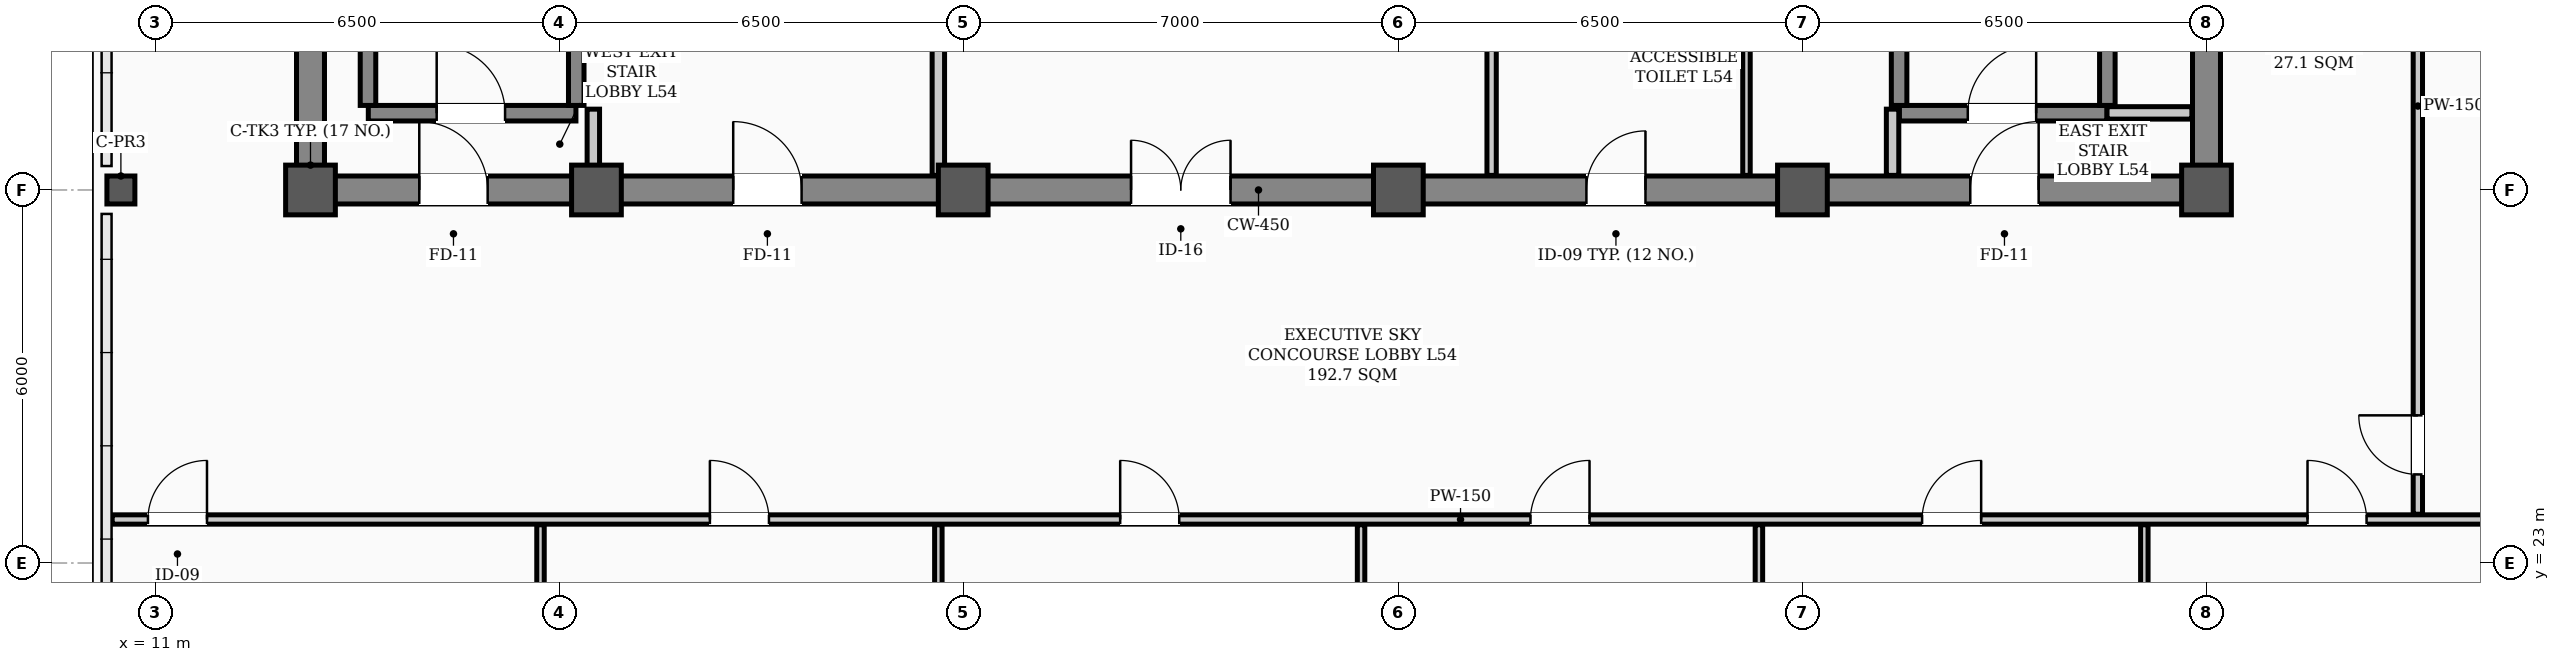
"""IFC4 building model, lengths in metres.
Left out: names, types, materials, properties, quantities, classifications, styles, units other than length and angle.
Written with IfcOpenShell. Run it as: python <this file> out.ifc"""

import sys

from ifc_helpers import new_model, si_unit, direction, frame, frame_2d, origin, origin_2d, place, context, subcontext, project, spatial, rectangle, hollow_rectangle, extrude, element, fill, save


model = new_model("IFC4")
c1 = context("Model", 3, precision=1e-05, world=origin(), true_north=direction((0.0, 1.0)))
c2 = subcontext(c1, "Body", "Model", "MODEL_VIEW")
j1 = project(units=[si_unit("LENGTHUNIT", "METRE"), si_unit("PLANEANGLEUNIT", "RADIAN")], contexts=[c1])
p1 = place(None, origin())
s1 = spatial("IfcSite", under=j1, at=p1, CompositionType="ELEMENT")
p2 = place(p1, origin())
s2 = spatial("IfcBuilding", under=s1, at=p2, CompositionType="ELEMENT")
p3 = place(p2, frame((0.0, 0.0, 218.9)))
s3 = spatial("IfcBuildingStorey", under=s2, at=p3, CompositionType="ELEMENT", Elevation=218.9)
for number, where, z_axis, x_axis in (
    (1, (13.5, 29.0, 0.0), (0.0, 0.0, 1.0), (1.0, 0.0, 0.0)),
    (2, (18.1, 29.0, 0.0), (0.0, 0.0, 1.0), (1.0, 0.0, 0.0)),
    (3, (24.0, 29.0, 0.0), (0.0, 0.0, 1.0), (1.0, 0.0, 0.0)),
    (4, (31.0, 29.0, 0.0), (0.0, 0.0, 1.0), (1.0, 0.0, 0.0)),
    (5, (37.5, 29.0, 0.0), (0.0, 0.0, 1.0), (1.0, 0.0, 0.0)),
    (6, (44.0, 29.0, 0.0), (0.0, 0.0, 1.0), (1.0, 0.0, 0.0)),
):
    element("IfcColumn", number, at=place(p3, frame(where, z_axis=z_axis, x_axis=x_axis)), inside=s3, PredefinedType="COLUMN", context=c2, shape_type="SweptSolid", body=[
        extrude(hollow_rectangle(XDim=0.8, YDim=0.8, WallThickness=0.032, InnerFilletRadius=0.016, OuterFilletRadius=0.048, at=origin_2d()), origin(), (0.0, 0.0, 1.0), 3.9),
    ])
p4 = place(p3, frame((10.45, 29.0, 0.0), z_axis=(0.0, 0.0, 1.0), x_axis=(1.0, 0.0, 0.0)))
e7 = element("IfcColumn", 7, at=p4, inside=s3, PredefinedType="COLUMN", context=c2, shape_type="SweptSolid", body=[
    extrude(hollow_rectangle(XDim=0.45, YDim=0.45, WallThickness=0.022, InnerFilletRadius=0.022, OuterFilletRadius=0.044, at=origin_2d()), origin(), (0.0, 0.0, 1.0), 3.9),
])
p5 = place(p3, frame((13.5, 29.0, 0.0), z_axis=(0.0, 0.0, 1.0), x_axis=(1.0, 0.0, 0.0)))
e8 = element("IfcWall", 8, at=p5, inside=s3, PredefinedType="SHEAR", context=c2, shape_type="SweptSolid", body=[
    extrude(rectangle(XDim=30.5, YDim=0.45, at=frame_2d((15.25, 0.0))), origin(), (0.0, 0.0, 1.0), 3.72),
])
p6 = place(p5, frame((1.75, 0.0, 0.0)))
e9 = element("IfcOpeningElement", 9, at=p6, cuts=e8, PredefinedType="OPENING", context=c2, shape_type="SweptSolid", body=[
    extrude(rectangle(XDim=1.1, YDim=2.08, at=frame_2d((0.55, 1.04))), frame((0.0, 0.235, 0.0), z_axis=(0.0, -1.0, 0.0), x_axis=(1.0, 0.0, 0.0)), (0.0, 0.0, 1.0), 0.47),
])
p7 = place(p5, frame((26.7, 0.0, 0.0)))
e10 = element("IfcOpeningElement", 10, at=p7, cuts=e8, PredefinedType="OPENING", context=c2, shape_type="SweptSolid", body=[
    extrude(rectangle(XDim=1.1, YDim=2.08, at=frame_2d((0.55, 1.04))), frame((0.0, 0.235, 0.0), z_axis=(0.0, -1.0, 0.0), x_axis=(1.0, 0.0, 0.0)), (0.0, 0.0, 1.0), 0.47),
])
p8 = place(p5, frame((6.8, 0.0, 0.0)))
e11 = element("IfcOpeningElement", 11, at=p8, cuts=e8, PredefinedType="OPENING", context=c2, shape_type="SweptSolid", body=[
    extrude(rectangle(XDim=1.1, YDim=2.08, at=frame_2d((0.55, 1.04))), frame((0.0, 0.235, 0.0), z_axis=(0.0, -1.0, 0.0), x_axis=(1.0, 0.0, 0.0)), (0.0, 0.0, 1.0), 0.47),
])
p9 = place(p5, frame((13.2, 0.0, 0.0)))
e12 = element("IfcOpeningElement", 12, at=p9, cuts=e8, PredefinedType="OPENING", context=c2, shape_type="SweptSolid", body=[
    extrude(rectangle(XDim=1.6, YDim=2.08, at=frame_2d((0.8, 1.04))), frame((0.0, 0.235, 0.0), z_axis=(0.0, -1.0, 0.0), x_axis=(1.0, 0.0, 0.0)), (0.0, 0.0, 1.0), 0.47),
])
p10 = place(p5, frame((20.525, 0.0, 0.0)))
e13 = element("IfcOpeningElement", 13, at=p10, cuts=e8, PredefinedType="OPENING", context=c2, shape_type="SweptSolid", body=[
    extrude(rectangle(XDim=0.95, YDim=2.08, at=frame_2d((0.475, 1.04))), frame((0.0, 0.235, 0.0), z_axis=(0.0, -1.0, 0.0), x_axis=(1.0, 0.0, 0.0)), (0.0, 0.0, 1.0), 0.47),
])
for number, where, z_axis, x_axis in (
    (14, (13.5, 29.35, 0.0), (0.0, 0.0, 1.0), (0.0, 1.0, 0.0)),
    (15, (44.0, 29.35, 0.0), (0.0, 0.0, 1.0), (0.0, 1.0, 0.0)),
):
    element("IfcWall", number, at=place(p3, frame(where, z_axis=z_axis, x_axis=x_axis)), inside=s3, PredefinedType="SHEAR", context=c2, shape_type="SweptSolid", body=[
        extrude(rectangle(XDim=8.6, YDim=0.45, at=frame_2d((4.3, 0.0))), origin(), (0.0, 0.0, 1.0), 3.72),
    ])
p11 = place(p3, frame((14.43, 30.235, 0.0), z_axis=(0.0, 0.0, 1.0), x_axis=(1.0, 0.0, 0.0)))
e16 = element("IfcWall", 16, at=p11, inside=s3, PredefinedType="STANDARD", context=c2, shape_type="SweptSolid", body=[
    extrude(rectangle(XDim=3.34, YDim=0.25, at=frame_2d((1.67, 0.0))), origin(), (0.0, 0.0, 1.0), 3.72),
])
p12 = place(p11, frame((1.1, 0.0, 0.0)))
e17 = element("IfcOpeningElement", 17, at=p12, cuts=e16, PredefinedType="OPENING", context=c2, shape_type="SweptSolid", body=[
    extrude(rectangle(XDim=1.1, YDim=2.08, at=frame_2d((0.55, 1.04))), frame((0.0, 0.135, 0.0), z_axis=(0.0, -1.0, 0.0), x_axis=(1.0, 0.0, 0.0)), (0.0, 0.0, 1.0), 0.27),
])
for number, where, z_axis, x_axis in (
    (18, (14.425, 30.36, 0.0), (0.0, 0.0, 1.0), (0.0, 1.0, 0.0)),
    (19, (17.775, 30.36, 0.0), (0.0, 0.0, 1.0), (0.0, 1.0, 0.0)),
):
    element("IfcWall", number, at=place(p3, frame(where, z_axis=z_axis, x_axis=x_axis)), inside=s3, PredefinedType="STANDARD", context=c2, shape_type="SweptSolid", body=[
        extrude(rectangle(XDim=7.184, YDim=0.25, at=frame_2d((3.592, 0.0))), origin(), (0.0, 0.0, 1.0), 3.72),
    ])
p13 = place(p3, frame((39.06, 30.235, 0.0), z_axis=(0.0, 0.0, 1.0), x_axis=(1.0, 0.0, 0.0)))
e20 = element("IfcWall", 20, at=p13, inside=s3, PredefinedType="STANDARD", context=c2, shape_type="SweptSolid", body=[
    extrude(rectangle(XDim=3.34, YDim=0.25, at=frame_2d((1.67, 0.0))), origin(), (0.0, 0.0, 1.0), 3.72),
])
p14 = place(p13, frame((1.1, 0.0, 0.0)))
e21 = element("IfcOpeningElement", 21, at=p14, cuts=e20, PredefinedType="OPENING", context=c2, shape_type="SweptSolid", body=[
    extrude(rectangle(XDim=1.1, YDim=2.08, at=frame_2d((0.55, 1.04))), frame((0.0, 0.135, 0.0), z_axis=(0.0, -1.0, 0.0), x_axis=(1.0, 0.0, 0.0)), (0.0, 0.0, 1.0), 0.27),
])
for number, where, z_axis, x_axis in (
    (22, (39.055, 30.36, 0.0), (0.0, 0.0, 1.0), (0.0, 1.0, 0.0)),
    (23, (42.405, 30.36, 0.0), (0.0, 0.0, 1.0), (0.0, 1.0, 0.0)),
):
    element("IfcWall", number, at=place(p3, frame(where, z_axis=z_axis, x_axis=x_axis)), inside=s3, PredefinedType="STANDARD", context=c2, shape_type="SweptSolid", body=[
        extrude(rectangle(XDim=7.184, YDim=0.25, at=frame_2d((3.592, 0.0))), origin(), (0.0, 0.0, 1.0), 3.72),
    ])
p15 = place(p3, frame((42.4, 30.24, 0.0), z_axis=(0.0, 0.0, 1.0), x_axis=(1.0, 0.0, 0.0)))
e24 = element("IfcWall", 24, at=p15, inside=s3, PredefinedType="STANDARD", context=c2, shape_type="SweptSolid", body=[
    extrude(rectangle(XDim=1.365, YDim=0.2, at=frame_2d((0.683, 0.0))), origin(), (0.0, 0.0, 1.0), 3.2),
])
p16 = place(p3, frame((10.31, 23.7, 0.0), z_axis=(0.0, 0.0, 1.0), x_axis=(1.0, 0.0, 0.0)))
e25 = element("IfcWall", 25, at=p16, inside=s3, PredefinedType="PARTITIONING", context=c2, shape_type="SweptSolid", body=[
    extrude(rectangle(XDim=43.38, YDim=0.15, at=frame_2d((21.69, 0.0))), origin(), (0.0, 0.0, 1.0), 3.2),
])
p17 = place(p16, frame((0.575, 0.0, 0.0)))
e26 = element("IfcOpeningElement", 26, at=p17, cuts=e25, PredefinedType="OPENING", context=c2, shape_type="SweptSolid", body=[
    extrude(rectangle(XDim=0.95, YDim=2.08, at=frame_2d((0.475, 1.04))), frame((0.0, 0.085, 0.0), z_axis=(0.0, -1.0, 0.0), x_axis=(1.0, 0.0, 0.0)), (0.0, 0.0, 1.0), 0.17),
])
p18 = place(p16, frame((9.615, 0.0, 0.0)))
e27 = element("IfcOpeningElement", 27, at=p18, cuts=e25, PredefinedType="OPENING", context=c2, shape_type="SweptSolid", body=[
    extrude(rectangle(XDim=0.95, YDim=2.08, at=frame_2d((0.475, 1.04))), frame((0.0, 0.085, 0.0), z_axis=(0.0, -1.0, 0.0), x_axis=(1.0, 0.0, 0.0)), (0.0, 0.0, 1.0), 0.17),
])
p19 = place(p16, frame((16.215, 0.0, 0.0)))
e28 = element("IfcOpeningElement", 28, at=p19, cuts=e25, PredefinedType="OPENING", context=c2, shape_type="SweptSolid", body=[
    extrude(rectangle(XDim=0.95, YDim=2.08, at=frame_2d((0.475, 1.04))), frame((0.0, 0.085, 0.0), z_axis=(0.0, -1.0, 0.0), x_axis=(1.0, 0.0, 0.0)), (0.0, 0.0, 1.0), 0.17),
])
p20 = place(p16, frame((22.815, 0.0, 0.0)))
e29 = element("IfcOpeningElement", 29, at=p20, cuts=e25, PredefinedType="OPENING", context=c2, shape_type="SweptSolid", body=[
    extrude(rectangle(XDim=0.95, YDim=2.08, at=frame_2d((0.475, 1.04))), frame((0.0, 0.085, 0.0), z_axis=(0.0, -1.0, 0.0), x_axis=(1.0, 0.0, 0.0)), (0.0, 0.0, 1.0), 0.17),
])
p21 = place(p16, frame((29.115, 0.0, 0.0)))
e30 = element("IfcOpeningElement", 30, at=p21, cuts=e25, PredefinedType="OPENING", context=c2, shape_type="SweptSolid", body=[
    extrude(rectangle(XDim=0.95, YDim=2.08, at=frame_2d((0.475, 1.04))), frame((0.0, 0.085, 0.0), z_axis=(0.0, -1.0, 0.0), x_axis=(1.0, 0.0, 0.0)), (0.0, 0.0, 1.0), 0.17),
])
p22 = place(p16, frame((35.315, 0.0, 0.0)))
e31 = element("IfcOpeningElement", 31, at=p22, cuts=e25, PredefinedType="OPENING", context=c2, shape_type="SweptSolid", body=[
    extrude(rectangle(XDim=0.95, YDim=2.08, at=frame_2d((0.475, 1.04))), frame((0.0, 0.085, 0.0), z_axis=(0.0, -1.0, 0.0), x_axis=(1.0, 0.0, 0.0)), (0.0, 0.0, 1.0), 0.17),
])
for number, where, z_axis, x_axis in (
    (32, (18.05, 29.235, 0.0), (0.0, 0.0, 1.0), (0.0, 1.0, 0.0)),
    (33, (38.95, 29.235, 0.0), (0.0, 0.0, 1.0), (0.0, 1.0, 0.0)),
):
    element("IfcWall", number, at=place(p3, frame(where, z_axis=z_axis, x_axis=x_axis)), inside=s3, PredefinedType="STANDARD", context=c2, shape_type="SweptSolid", body=[
        extrude(rectangle(XDim=1.065, YDim=0.2, at=frame_2d((0.532, 0.0))), origin(), (0.0, 0.0, 1.0), 3.35),
    ])
p23 = place(p3, frame((23.6, 29.235, 0.0), z_axis=(0.0, 0.0, 1.0), x_axis=(0.0, 1.0, 0.0)))
e34 = element("IfcWall", 34, at=p23, inside=s3, PredefinedType="STANDARD", context=c2, shape_type="SweptSolid", body=[
    extrude(rectangle(XDim=5.465, YDim=0.2, at=frame_2d((2.732, 0.0))), origin(), (0.0, 0.0, 1.0), 3.2),
])
p24 = place(p3, frame((32.5, 29.235, 0.0), z_axis=(0.0, 0.0, 1.0), x_axis=(0.0, 1.0, 0.0)))
e35 = element("IfcWall", 35, at=p24, inside=s3, PredefinedType="PARTITIONING", context=c2, shape_type="SweptSolid", body=[
    extrude(rectangle(XDim=2.53, YDim=0.15, at=frame_2d((1.265, 0.0))), origin(), (0.0, 0.0, 1.0), 3.35),
])
p25 = place(p3, frame((36.6, 29.235, 0.0), z_axis=(0.0, 0.0, 1.0), x_axis=(0.0, 1.0, 0.0)))
e36 = element("IfcWall", 36, at=p25, inside=s3, PredefinedType="PARTITIONING", context=c2, shape_type="SweptSolid", body=[
    extrude(rectangle(XDim=2.53, YDim=0.12, at=frame_2d((1.265, 0.0))), origin(), (0.0, 0.0, 1.0), 3.35),
])
p26 = place(p3, frame((47.4, 23.785, 0.0), z_axis=(0.0, 0.0, 1.0), x_axis=(0.0, 1.0, 0.0)))
e37 = element("IfcWall", 37, at=p26, inside=s3, PredefinedType="PARTITIONING", context=c2, shape_type="SweptSolid", body=[
    extrude(rectangle(XDim=13.13, YDim=0.15, at=frame_2d((6.565, 0.0))), origin(), (0.0, 0.0, 1.0), 3.1),
])
p27 = place(p26, frame((0.64, 0.0, 0.0)))
e38 = element("IfcOpeningElement", 38, at=p27, cuts=e37, PredefinedType="OPENING", context=c2, shape_type="SweptSolid", body=[
    extrude(rectangle(XDim=0.95, YDim=2.08, at=frame_2d((0.475, 1.04))), frame((0.0, 0.085, 0.0), z_axis=(0.0, -1.0, 0.0), x_axis=(1.0, 0.0, 0.0)), (0.0, 0.0, 1.0), 0.17),
])
p28 = place(p26, frame((10.44, 0.0, 0.0)))
e39 = element("IfcOpeningElement", 39, at=p28, cuts=e37, PredefinedType="OPENING", context=c2, shape_type="SweptSolid", body=[
    extrude(rectangle(XDim=0.95, YDim=2.08, at=frame_2d((0.475, 1.04))), frame((0.0, 0.085, 0.0), z_axis=(0.0, -1.0, 0.0), x_axis=(1.0, 0.0, 0.0)), (0.0, 0.0, 1.0), 0.17),
])
p29 = place(p3, frame((17.2, 11.56, 0.0), z_axis=(0.0, 0.0, 1.0), x_axis=(0.0, 1.0, 0.0)))
e40 = element("IfcWall", 40, at=p29, inside=s3, PredefinedType="PARTITIONING", context=c2, shape_type="SweptSolid", body=[
    extrude(rectangle(XDim=12.055, YDim=0.12, at=frame_2d((6.027, 0.0))), origin(), (0.0, 0.0, 1.0), 3.1),
])
p30 = place(p3, frame((23.6, 13.32, 0.0), z_axis=(0.0, 0.0, 1.0), x_axis=(0.0, 1.0, 0.0)))
e41 = element("IfcWall", 41, at=p30, inside=s3, PredefinedType="PARTITIONING", context=c2, shape_type="SweptSolid", body=[
    extrude(rectangle(XDim=10.295, YDim=0.12, at=frame_2d((5.147, 0.0))), origin(), (0.0, 0.0, 1.0), 3.1),
])
for number, where, z_axis, x_axis in (
    (42, (30.4, 11.56, 0.0), (0.0, 0.0, 1.0), (0.0, 1.0, 0.0)),
    (43, (36.8, 11.56, 0.0), (0.0, 0.0, 1.0), (0.0, 1.0, 0.0)),
    (44, (43.0, 11.56, 0.0), (0.0, 0.0, 1.0), (0.0, 1.0, 0.0)),
):
    element("IfcWall", number, at=place(p3, frame(where, z_axis=z_axis, x_axis=x_axis)), inside=s3, PredefinedType="PARTITIONING", context=c2, shape_type="SweptSolid", body=[
        extrude(rectangle(XDim=12.055, YDim=0.12, at=frame_2d((6.027, 0.0))), origin(), (0.0, 0.0, 1.0), 3.1),
    ])
p31 = place(p12, origin())
e45 = element("IfcDoor", 45, at=p31, inside=s3, OperationType="SINGLE_SWING_LEFT", PredefinedType="DOOR", context=c2, shape_type="SweptSolid", body=[
    extrude(rectangle(XDim=1.1, YDim=2.08, at=frame_2d((0.55, 1.04))), frame((0.0, 0.025, 0.0), z_axis=(0.0, -1.0, 0.0), x_axis=(1.0, 0.0, 0.0)), (0.0, 0.0, 1.0), 0.05),
])
fill(e17, e45)
p32 = place(p14, origin())
e46 = element("IfcDoor", 46, at=p32, inside=s3, OperationType="SINGLE_SWING_RIGHT", PredefinedType="DOOR", context=c2, shape_type="SweptSolid", body=[
    extrude(rectangle(XDim=1.1, YDim=2.08, at=frame_2d((0.55, 1.04))), frame((0.0, 0.025, 0.0), z_axis=(0.0, -1.0, 0.0), x_axis=(1.0, 0.0, 0.0)), (0.0, 0.0, 1.0), 0.05),
])
fill(e21, e46)
p33 = place(p6, origin())
e47 = element("IfcDoor", 47, at=p33, inside=s3, OperationType="SINGLE_SWING_LEFT", PredefinedType="DOOR", context=c2, shape_type="SweptSolid", body=[
    extrude(rectangle(XDim=1.1, YDim=2.08, at=frame_2d((0.55, 1.04))), frame((0.0, 0.025, 0.0), z_axis=(0.0, -1.0, 0.0), x_axis=(1.0, 0.0, 0.0)), (0.0, 0.0, 1.0), 0.05),
])
fill(e9, e47)
p34 = place(p7, origin())
e48 = element("IfcDoor", 48, at=p34, inside=s3, OperationType="SINGLE_SWING_RIGHT", PredefinedType="DOOR", context=c2, shape_type="SweptSolid", body=[
    extrude(rectangle(XDim=1.1, YDim=2.08, at=frame_2d((0.55, 1.04))), frame((0.0, 0.025, 0.0), z_axis=(0.0, -1.0, 0.0), x_axis=(1.0, 0.0, 0.0)), (0.0, 0.0, 1.0), 0.05),
])
fill(e10, e48)
p35 = place(p8, origin())
e49 = element("IfcDoor", 49, at=p35, inside=s3, OperationType="SINGLE_SWING_LEFT", PredefinedType="DOOR", context=c2, shape_type="SweptSolid", body=[
    extrude(rectangle(XDim=1.1, YDim=2.08, at=frame_2d((0.55, 1.04))), frame((0.0, 0.025, 0.0), z_axis=(0.0, -1.0, 0.0), x_axis=(1.0, 0.0, 0.0)), (0.0, 0.0, 1.0), 0.05),
])
fill(e11, e49)
p36 = place(p9, origin())
e50 = element("IfcDoor", 50, at=p36, inside=s3, OperationType="DOUBLE_DOOR_SINGLE_SWING", PredefinedType="DOOR", context=c2, shape_type="SweptSolid", body=[
    extrude(rectangle(XDim=1.6, YDim=2.08, at=frame_2d((0.8, 1.04))), frame((0.0, 0.025, 0.0), z_axis=(0.0, -1.0, 0.0), x_axis=(1.0, 0.0, 0.0)), (0.0, 0.0, 1.0), 0.05),
])
fill(e12, e50)
p37 = place(p10, origin())
e51 = element("IfcDoor", 51, at=p37, inside=s3, OperationType="SINGLE_SWING_RIGHT", PredefinedType="DOOR", context=c2, shape_type="SweptSolid", body=[
    extrude(rectangle(XDim=0.95, YDim=2.08, at=frame_2d((0.475, 1.04))), frame((0.0, 0.025, 0.0), z_axis=(0.0, -1.0, 0.0), x_axis=(1.0, 0.0, 0.0)), (0.0, 0.0, 1.0), 0.05),
])
fill(e13, e51)
p38 = place(p17, origin())
e52 = element("IfcDoor", 52, at=p38, inside=s3, OperationType="SINGLE_SWING_RIGHT", PredefinedType="DOOR", context=c2, shape_type="SweptSolid", body=[
    extrude(rectangle(XDim=0.95, YDim=2.08, at=frame_2d((0.475, 1.04))), frame((0.0, 0.025, 0.0), z_axis=(0.0, -1.0, 0.0), x_axis=(1.0, 0.0, 0.0)), (0.0, 0.0, 1.0), 0.05),
])
fill(e26, e52)
p39 = place(p18, origin())
e53 = element("IfcDoor", 53, at=p39, inside=s3, OperationType="SINGLE_SWING_LEFT", PredefinedType="DOOR", context=c2, shape_type="SweptSolid", body=[
    extrude(rectangle(XDim=0.95, YDim=2.08, at=frame_2d((0.475, 1.04))), frame((0.0, 0.025, 0.0), z_axis=(0.0, -1.0, 0.0), x_axis=(1.0, 0.0, 0.0)), (0.0, 0.0, 1.0), 0.05),
])
fill(e27, e53)
p40 = place(p19, origin())
e54 = element("IfcDoor", 54, at=p40, inside=s3, OperationType="SINGLE_SWING_LEFT", PredefinedType="DOOR", context=c2, shape_type="SweptSolid", body=[
    extrude(rectangle(XDim=0.95, YDim=2.08, at=frame_2d((0.475, 1.04))), frame((0.0, 0.025, 0.0), z_axis=(0.0, -1.0, 0.0), x_axis=(1.0, 0.0, 0.0)), (0.0, 0.0, 1.0), 0.05),
])
fill(e28, e54)
p41 = place(p20, origin())
e55 = element("IfcDoor", 55, at=p41, inside=s3, OperationType="SINGLE_SWING_RIGHT", PredefinedType="DOOR", context=c2, shape_type="SweptSolid", body=[
    extrude(rectangle(XDim=0.95, YDim=2.08, at=frame_2d((0.475, 1.04))), frame((0.0, 0.025, 0.0), z_axis=(0.0, -1.0, 0.0), x_axis=(1.0, 0.0, 0.0)), (0.0, 0.0, 1.0), 0.05),
])
fill(e29, e55)
p42 = place(p21, origin())
e56 = element("IfcDoor", 56, at=p42, inside=s3, OperationType="SINGLE_SWING_RIGHT", PredefinedType="DOOR", context=c2, shape_type="SweptSolid", body=[
    extrude(rectangle(XDim=0.95, YDim=2.08, at=frame_2d((0.475, 1.04))), frame((0.0, 0.025, 0.0), z_axis=(0.0, -1.0, 0.0), x_axis=(1.0, 0.0, 0.0)), (0.0, 0.0, 1.0), 0.05),
])
fill(e30, e56)
p43 = place(p22, origin())
e57 = element("IfcDoor", 57, at=p43, inside=s3, OperationType="SINGLE_SWING_LEFT", PredefinedType="DOOR", context=c2, shape_type="SweptSolid", body=[
    extrude(rectangle(XDim=0.95, YDim=2.08, at=frame_2d((0.475, 1.04))), frame((0.0, 0.025, 0.0), z_axis=(0.0, -1.0, 0.0), x_axis=(1.0, 0.0, 0.0)), (0.0, 0.0, 1.0), 0.05),
])
fill(e31, e57)
p44 = place(p27, origin())
e58 = element("IfcDoor", 58, at=p44, inside=s3, OperationType="SINGLE_SWING_RIGHT", PredefinedType="DOOR", context=c2, shape_type="SweptSolid", body=[
    extrude(rectangle(XDim=0.95, YDim=2.08, at=frame_2d((0.475, 1.04))), frame((0.0, 0.025, 0.0), z_axis=(0.0, -1.0, 0.0), x_axis=(1.0, 0.0, 0.0)), (0.0, 0.0, 1.0), 0.05),
])
fill(e38, e58)
save(model, sys.argv[1])
